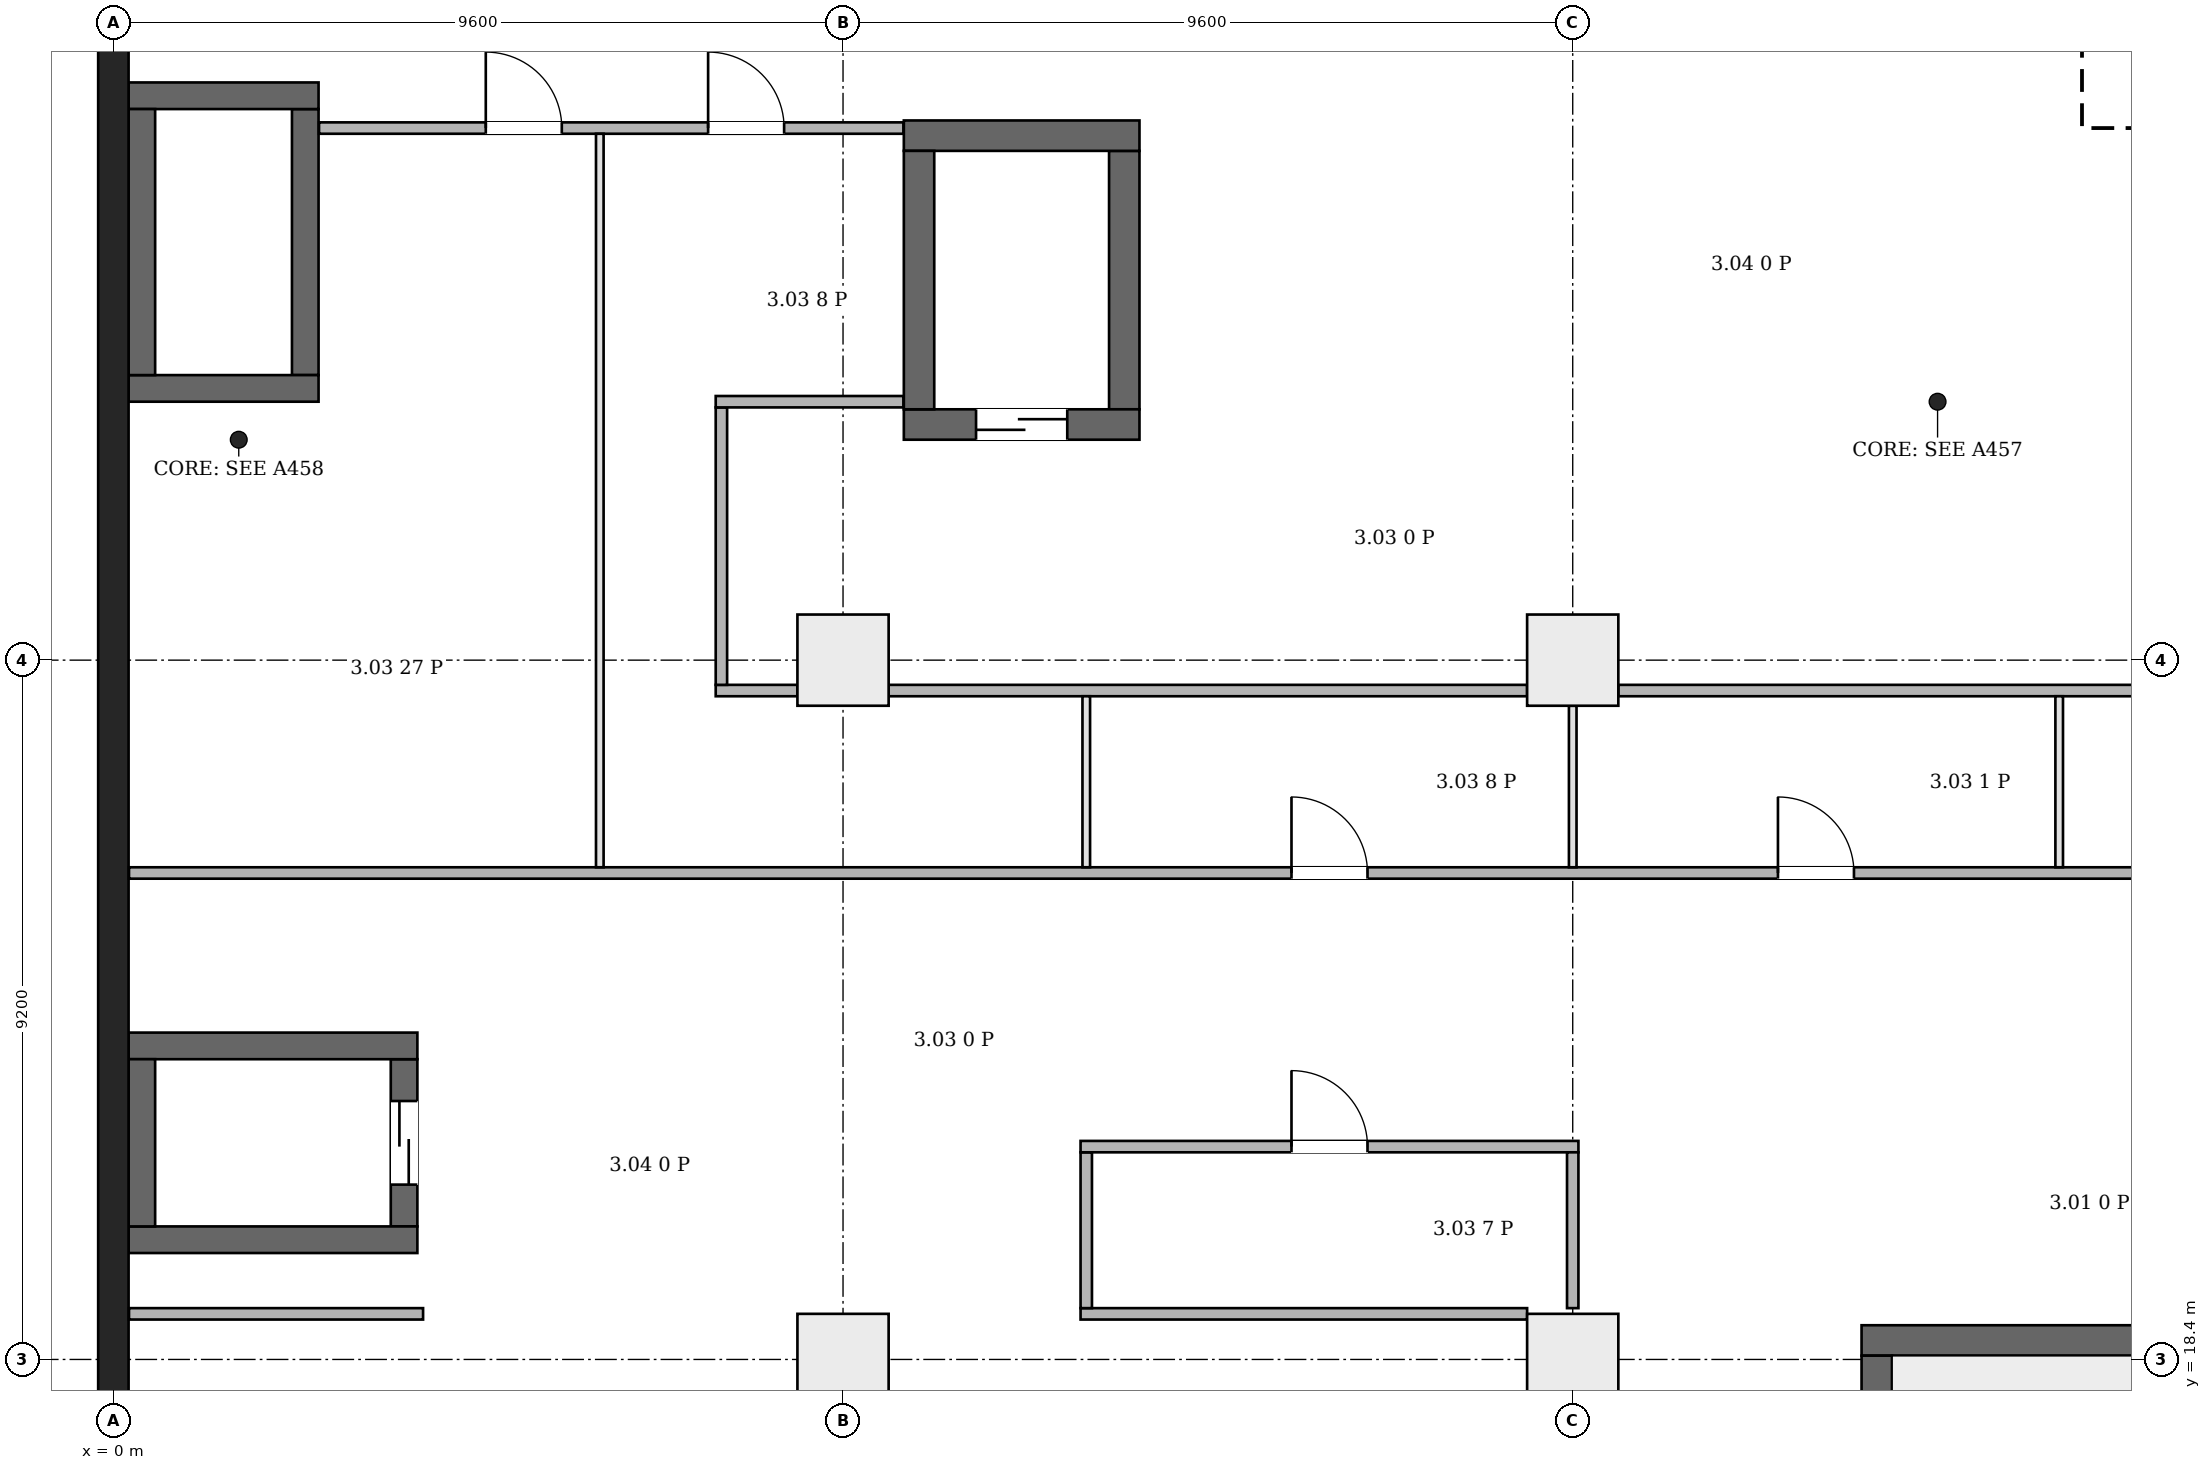
"""IFC4 building model, lengths in metres.
Left out: names, types, materials, properties, quantities, classifications, styles, units other than length and angle.
Written with IfcOpenShell. Run it as: python <this file> out.ifc"""

import sys

from ifc_helpers import new_model, si_unit, direction, frame, frame_2d, origin, origin_2d, place, context, subcontext, project, spatial, rectangle, extrude, element, fill, save


model = new_model("IFC4")
c1 = context("Model", 3, precision=1e-05, world=origin(), true_north=direction((0.0, 1.0)))
c2 = subcontext(c1, "Body", "Model", "MODEL_VIEW")
j1 = project(units=[si_unit("LENGTHUNIT", "METRE"), si_unit("PLANEANGLEUNIT", "RADIAN")], contexts=[c1])
p1 = place(None, origin())
s1 = spatial("IfcSite", under=j1, at=p1, CompositionType="ELEMENT")
p2 = place(p1, origin())
s2 = spatial("IfcBuilding", under=s1, at=p2, CompositionType="ELEMENT")
p3 = place(p2, frame((0.0, 0.0, 21.7)))
s3 = spatial("IfcBuildingStorey", under=s2, at=p3, CompositionType="ELEMENT", Elevation=21.7)
p4 = place(p3, frame((0.0, -0.2, 0.0), z_axis=(0.0, 0.0, 1.0), x_axis=(0.0, 1.0, 0.0)))
e1 = element("IfcWall", 1, at=p4, inside=s3, PredefinedType="SHEAR", context=c2, shape_type="SweptSolid", body=[
    extrude(rectangle(XDim=46.88, YDim=0.4, at=frame_2d((23.44, 0.0))), origin(), (0.0, 0.0, 1.0), 5.0),
])
p5 = place(p3, frame((23.0, 18.65, 0.0), z_axis=(0.0, 0.0, 1.0), x_axis=(1.0, 0.0, 0.0)))
e2 = element("IfcWall", 2, at=p5, inside=s3, PredefinedType="SHEAR", context=c2, shape_type="SweptSolid", body=[
    extrude(rectangle(XDim=4.2, YDim=0.4, at=frame_2d((2.1, 0.0))), origin(), (0.0, 0.0, 1.0), 5.0),
])
p6 = place(p3, frame((23.2, 11.85, 0.0), z_axis=(0.0, 0.0, 1.0), x_axis=(0.0, 1.0, 0.0)))
e3 = element("IfcWall", 3, at=p6, inside=s3, PredefinedType="SHEAR", context=c2, shape_type="SweptSolid", body=[
    extrude(rectangle(XDim=6.6, YDim=0.4, at=frame_2d((3.3, 0.0))), origin(), (0.0, 0.0, 1.0), 5.0),
])
for number, where, z_axis, x_axis in (
    (4, (0.2, 19.975, 0.0), (0.0, 0.0, 1.0), (1.0, 0.0, 0.0)),
    (5, (0.2, 22.525, 0.0), (0.0, 0.0, 1.0), (1.0, 0.0, 0.0)),
):
    element("IfcWall", number, at=place(p3, frame(where, z_axis=z_axis, x_axis=x_axis)), inside=s3, PredefinedType="SHEAR", context=c2, shape_type="SweptSolid", body=[
        extrude(rectangle(XDim=3.8, YDim=0.35, at=frame_2d((1.9, 0.0))), origin(), (0.0, 0.0, 1.0), 5.0),
    ])
p7 = place(p3, frame((0.375, 20.15, 0.0), z_axis=(0.0, 0.0, 1.0), x_axis=(0.0, 1.0, 0.0)))
e6 = element("IfcWall", 6, at=p7, inside=s3, PredefinedType="SHEAR", context=c2, shape_type="SweptSolid", body=[
    extrude(rectangle(XDim=2.2, YDim=0.35, at=frame_2d((1.1, 0.0))), origin(), (0.0, 0.0, 1.0), 5.0),
])
p8 = place(p3, frame((3.825, 20.15, 0.0), z_axis=(0.0, 0.0, 1.0), x_axis=(0.0, 1.0, 0.0)))
e7 = element("IfcWall", 7, at=p8, inside=s3, PredefinedType="SHEAR", context=c2, shape_type="SweptSolid", body=[
    extrude(rectangle(XDim=2.2, YDim=0.35, at=frame_2d((1.1, 0.0))), origin(), (0.0, 0.0, 1.0), 5.0),
])
p9 = place(p8, frame((0.55, 0.0, 0.0)))
e8 = element("IfcOpeningElement", 8, at=p9, cuts=e7, PredefinedType="OPENING", context=c2, shape_type="SweptSolid", body=[
    extrude(rectangle(XDim=1.1, YDim=2.1, at=frame_2d((0.55, 1.05))), frame((0.0, 0.185, 0.0), z_axis=(0.0, -1.0, 0.0), x_axis=(1.0, 0.0, 0.0)), (0.0, 0.0, 1.0), 0.37),
])
for number, where, z_axis, x_axis in (
    (9, (0.2, 31.175, 0.0), (0.0, 0.0, 1.0), (1.0, 0.0, 0.0)),
    (10, (0.2, 35.025, 0.0), (0.0, 0.0, 1.0), (1.0, 0.0, 0.0)),
):
    element("IfcWall", number, at=place(p3, frame(where, z_axis=z_axis, x_axis=x_axis)), inside=s3, PredefinedType="SHEAR", context=c2, shape_type="SweptSolid", body=[
        extrude(rectangle(XDim=2.5, YDim=0.35, at=frame_2d((1.25, 0.0))), origin(), (0.0, 0.0, 1.0), 5.0),
    ])
for number, where, z_axis, x_axis in (
    (11, (0.375, 31.35, 0.0), (0.0, 0.0, 1.0), (0.0, 1.0, 0.0)),
    (12, (2.525, 31.35, 0.0), (0.0, 0.0, 1.0), (0.0, 1.0, 0.0)),
):
    element("IfcWall", number, at=place(p3, frame(where, z_axis=z_axis, x_axis=x_axis)), inside=s3, PredefinedType="SHEAR", context=c2, shape_type="SweptSolid", body=[
        extrude(rectangle(XDim=3.5, YDim=0.35, at=frame_2d((1.75, 0.0))), origin(), (0.0, 0.0, 1.0), 5.0),
    ])
p10 = place(p3, frame((10.4, 30.7, 0.0), z_axis=(0.0, 0.0, 1.0), x_axis=(1.0, 0.0, 0.0)))
e13 = element("IfcWall", 13, at=p10, inside=s3, PredefinedType="SHEAR", context=c2, shape_type="SweptSolid", body=[
    extrude(rectangle(XDim=3.1, YDim=0.4, at=frame_2d((1.55, 0.0))), origin(), (0.0, 0.0, 1.0), 5.0),
])
p11 = place(p10, frame((0.95, 0.0, 0.0)))
e14 = element("IfcOpeningElement", 14, at=p11, cuts=e13, PredefinedType="OPENING", context=c2, shape_type="SweptSolid", body=[
    extrude(rectangle(XDim=1.2, YDim=2.1, at=frame_2d((0.6, 1.05))), frame((0.0, 0.21, 0.0), z_axis=(0.0, -1.0, 0.0), x_axis=(1.0, 0.0, 0.0)), (0.0, 0.0, 1.0), 0.42),
])
p12 = place(p3, frame((10.4, 34.5, 0.0), z_axis=(0.0, 0.0, 1.0), x_axis=(1.0, 0.0, 0.0)))
e15 = element("IfcWall", 15, at=p12, inside=s3, PredefinedType="SHEAR", context=c2, shape_type="SweptSolid", body=[
    extrude(rectangle(XDim=3.1, YDim=0.4, at=frame_2d((1.55, 0.0))), origin(), (0.0, 0.0, 1.0), 5.0),
])
for number, where, z_axis, x_axis in (
    (16, (10.6, 30.9, 0.0), (0.0, 0.0, 1.0), (0.0, 1.0, 0.0)),
    (17, (13.3, 30.9, 0.0), (0.0, 0.0, 1.0), (0.0, 1.0, 0.0)),
):
    element("IfcWall", number, at=place(p3, frame(where, z_axis=z_axis, x_axis=x_axis)), inside=s3, PredefinedType="SHEAR", context=c2, shape_type="SweptSolid", body=[
        extrude(rectangle(XDim=3.4, YDim=0.4, at=frame_2d((1.7, 0.0))), origin(), (0.0, 0.0, 1.0), 5.0),
    ])
for number, where, z_axis, x_axis in (
    (18, (9.6, 18.4, 0.0), (0.0, 0.0, 1.0), (1.0, 0.0, 0.0)),
    (19, (19.2, 18.4, 0.0), (0.0, 0.0, 1.0), (1.0, 0.0, 0.0)),
    (20, (9.6, 27.6, 0.0), (0.0, 0.0, 1.0), (1.0, 0.0, 0.0)),
    (21, (19.2, 27.6, 0.0), (0.0, 0.0, 1.0), (1.0, 0.0, 0.0)),
):
    element("IfcColumn", number, at=place(p3, frame(where, z_axis=z_axis, x_axis=x_axis)), inside=s3, PredefinedType="COLUMN", context=c2, shape_type="SweptSolid", body=[
        extrude(rectangle(XDim=1.2, YDim=1.2, at=origin_2d()), origin(), (0.0, 0.0, 1.0), 5.0),
    ])
p13 = place(p3, frame((0.206, 19.0, 0.0), z_axis=(0.0, 0.0, 1.0), x_axis=(1.0, 0.0, 0.0)))
e22 = element("IfcWall", 22, at=p13, inside=s3, PredefinedType="PARTITIONING", context=c2, shape_type="SweptSolid", body=[
    extrude(rectangle(XDim=3.869, YDim=0.15, at=frame_2d((1.935, 0.0))), origin(), (0.0, 0.0, 1.0), 4.65),
])
p14 = place(p3, frame((0.206, 24.8, 0.0), z_axis=(0.0, 0.0, 1.0), x_axis=(1.0, 0.0, 0.0)))
e23 = element("IfcWall", 23, at=p14, inside=s3, PredefinedType="PARTITIONING", context=c2, shape_type="SweptSolid", body=[
    extrude(rectangle(XDim=39.119, YDim=0.15, at=frame_2d((19.56, 0.0))), origin(), (0.0, 0.0, 1.0), 4.65),
])
p15 = place(p14, frame((15.294, 0.0, 0.0)))
e24 = element("IfcOpeningElement", 24, at=p15, cuts=e23, PredefinedType="OPENING", context=c2, shape_type="SweptSolid", body=[
    extrude(rectangle(XDim=1.0, YDim=2.1, at=frame_2d((0.5, 1.05))), frame((0.0, 0.085, 0.0), z_axis=(0.0, -1.0, 0.0), x_axis=(1.0, 0.0, 0.0)), (0.0, 0.0, 1.0), 0.17),
])
p16 = place(p14, frame((21.694, 0.0, 0.0)))
e25 = element("IfcOpeningElement", 25, at=p16, cuts=e23, PredefinedType="OPENING", context=c2, shape_type="SweptSolid", body=[
    extrude(rectangle(XDim=1.0, YDim=2.1, at=frame_2d((0.5, 1.05))), frame((0.0, 0.085, 0.0), z_axis=(0.0, -1.0, 0.0), x_axis=(1.0, 0.0, 0.0)), (0.0, 0.0, 1.0), 0.17),
])
p17 = place(p14, frame((28.094, 0.0, 0.0)))
e26 = element("IfcOpeningElement", 26, at=p17, cuts=e23, PredefinedType="OPENING", context=c2, shape_type="SweptSolid", body=[
    extrude(rectangle(XDim=1.0, YDim=2.1, at=frame_2d((0.5, 1.05))), frame((0.0, 0.085, 0.0), z_axis=(0.0, -1.0, 0.0), x_axis=(1.0, 0.0, 0.0)), (0.0, 0.0, 1.0), 0.17),
])
p18 = place(p3, frame((2.706, 34.6, 0.0), z_axis=(0.0, 0.0, 1.0), x_axis=(1.0, 0.0, 0.0)))
e27 = element("IfcWall", 27, at=p18, inside=s3, PredefinedType="PARTITIONING", context=c2, shape_type="SweptSolid", body=[
    extrude(rectangle(XDim=7.688, YDim=0.15, at=frame_2d((3.844, 0.0))), origin(), (0.0, 0.0, 1.0), 4.65),
])
p19 = place(p18, frame((2.194, 0.0, 0.0)))
e28 = element("IfcOpeningElement", 28, at=p19, cuts=e27, PredefinedType="OPENING", context=c2, shape_type="SweptSolid", body=[
    extrude(rectangle(XDim=1.0, YDim=2.1, at=frame_2d((0.5, 1.05))), frame((0.0, 0.085, 0.0), z_axis=(0.0, -1.0, 0.0), x_axis=(1.0, 0.0, 0.0)), (0.0, 0.0, 1.0), 0.17),
])
p20 = place(p18, frame((5.119, 0.0, 0.0)))
e29 = element("IfcOpeningElement", 29, at=p20, cuts=e27, PredefinedType="OPENING", context=c2, shape_type="SweptSolid", body=[
    extrude(rectangle(XDim=1.0, YDim=2.1, at=frame_2d((0.5, 1.05))), frame((0.0, 0.085, 0.0), z_axis=(0.0, -1.0, 0.0), x_axis=(1.0, 0.0, 0.0)), (0.0, 0.0, 1.0), 0.17),
])
p21 = place(p3, frame((6.4, 24.875, 0.0), z_axis=(0.0, 0.0, 1.0), x_axis=(0.0, 1.0, 0.0)))
e30 = element("IfcWall", 30, at=p21, inside=s3, PredefinedType="PARTITIONING", context=c2, shape_type="SweptSolid", body=[
    extrude(rectangle(XDim=9.65, YDim=0.1, at=frame_2d((4.825, 0.0))), origin(), (0.0, 0.0, 1.0), 4.65),
])
p22 = place(p3, frame((7.925, 27.2, 0.0), z_axis=(0.0, 0.0, 1.0), x_axis=(1.0, 0.0, 0.0)))
e31 = element("IfcWall", 31, at=p22, inside=s3, PredefinedType="PARTITIONING", context=c2, shape_type="SweptSolid", body=[
    extrude(rectangle(XDim=1.075, YDim=0.15, at=frame_2d((0.538, 0.0))), origin(), (0.0, 0.0, 1.0), 4.65),
])
p23 = place(p3, frame((8.0, 27.275, 0.0), z_axis=(0.0, 0.0, 1.0), x_axis=(0.0, 1.0, 0.0)))
e32 = element("IfcWall", 32, at=p23, inside=s3, PredefinedType="PARTITIONING", context=c2, shape_type="SweptSolid", body=[
    extrude(rectangle(XDim=3.65, YDim=0.15, at=frame_2d((1.825, 0.0))), origin(), (0.0, 0.0, 1.0), 4.65),
])
p24 = place(p3, frame((7.925, 31.0, 0.0), z_axis=(0.0, 0.0, 1.0), x_axis=(1.0, 0.0, 0.0)))
e33 = element("IfcWall", 33, at=p24, inside=s3, PredefinedType="PARTITIONING", context=c2, shape_type="SweptSolid", body=[
    extrude(rectangle(XDim=2.469, YDim=0.15, at=frame_2d((1.234, 0.0))), origin(), (0.0, 0.0, 1.0), 4.65),
])
p25 = place(p3, frame((10.2, 27.2, 0.0), z_axis=(0.0, 0.0, 1.0), x_axis=(1.0, 0.0, 0.0)))
e34 = element("IfcWall", 34, at=p25, inside=s3, PredefinedType="PARTITIONING", context=c2, shape_type="SweptSolid", body=[
    extrude(rectangle(XDim=8.4, YDim=0.15, at=frame_2d((4.2, 0.0))), origin(), (0.0, 0.0, 1.0), 4.65),
])
p26 = place(p3, frame((12.725, 19.0, 0.0), z_axis=(0.0, 0.0, 1.0), x_axis=(1.0, 0.0, 0.0)))
e35 = element("IfcWall", 35, at=p26, inside=s3, PredefinedType="PARTITIONING", context=c2, shape_type="SweptSolid", body=[
    extrude(rectangle(XDim=5.875, YDim=0.15, at=frame_2d((2.938, 0.0))), origin(), (0.0, 0.0, 1.0), 4.65),
])
p27 = place(p3, frame((12.8, 19.075, 0.0), z_axis=(0.0, 0.0, 1.0), x_axis=(0.0, 1.0, 0.0)))
e36 = element("IfcWall", 36, at=p27, inside=s3, PredefinedType="PARTITIONING", context=c2, shape_type="SweptSolid", body=[
    extrude(rectangle(XDim=2.05, YDim=0.15, at=frame_2d((1.025, 0.0))), origin(), (0.0, 0.0, 1.0), 4.65),
])
p28 = place(p3, frame((12.725, 21.2, 0.0), z_axis=(0.0, 0.0, 1.0), x_axis=(1.0, 0.0, 0.0)))
e37 = element("IfcWall", 37, at=p28, inside=s3, PredefinedType="PARTITIONING", context=c2, shape_type="SweptSolid", body=[
    extrude(rectangle(XDim=6.55, YDim=0.15, at=frame_2d((3.275, 0.0))), origin(), (0.0, 0.0, 1.0), 4.65),
])
p29 = place(p28, frame((2.775, 0.0, 0.0)))
e38 = element("IfcOpeningElement", 38, at=p29, cuts=e37, PredefinedType="OPENING", context=c2, shape_type="SweptSolid", body=[
    extrude(rectangle(XDim=1.0, YDim=2.1, at=frame_2d((0.5, 1.05))), frame((0.0, 0.085, 0.0), z_axis=(0.0, -1.0, 0.0), x_axis=(1.0, 0.0, 0.0)), (0.0, 0.0, 1.0), 0.17),
])
p30 = place(p3, frame((12.8, 24.875, 0.0), z_axis=(0.0, 0.0, 1.0), x_axis=(0.0, 1.0, 0.0)))
e39 = element("IfcWall", 39, at=p30, inside=s3, PredefinedType="PARTITIONING", context=c2, shape_type="SweptSolid", body=[
    extrude(rectangle(XDim=2.25, YDim=0.1, at=frame_2d((1.125, 0.0))), origin(), (0.0, 0.0, 1.0), 4.65),
])
p31 = place(p3, frame((19.2, 19.075, 0.0), z_axis=(0.0, 0.0, 1.0), x_axis=(0.0, 1.0, 0.0)))
e40 = element("IfcWall", 40, at=p31, inside=s3, PredefinedType="PARTITIONING", context=c2, shape_type="SweptSolid", body=[
    extrude(rectangle(XDim=2.05, YDim=0.15, at=frame_2d((1.025, 0.0))), origin(), (0.0, 0.0, 1.0), 4.25),
])
p32 = place(p3, frame((19.2, 24.875, 0.0), z_axis=(0.0, 0.0, 1.0), x_axis=(0.0, 1.0, 0.0)))
e41 = element("IfcWall", 41, at=p32, inside=s3, PredefinedType="PARTITIONING", context=c2, shape_type="SweptSolid", body=[
    extrude(rectangle(XDim=2.125, YDim=0.1, at=frame_2d((1.062, 0.0))), origin(), (0.0, 0.0, 1.0), 4.25),
])
p33 = place(p3, frame((19.8, 27.2, 0.0), z_axis=(0.0, 0.0, 1.0), x_axis=(1.0, 0.0, 0.0)))
e42 = element("IfcWall", 42, at=p33, inside=s3, PredefinedType="PARTITIONING", context=c2, shape_type="SweptSolid", body=[
    extrude(rectangle(XDim=8.4, YDim=0.15, at=frame_2d((4.2, 0.0))), origin(), (0.0, 0.0, 1.0), 4.65),
])
p34 = place(p3, frame((25.6, 24.875, 0.0), z_axis=(0.0, 0.0, 1.0), x_axis=(0.0, 1.0, 0.0)))
e43 = element("IfcWall", 43, at=p34, inside=s3, PredefinedType="PARTITIONING", context=c2, shape_type="SweptSolid", body=[
    extrude(rectangle(XDim=2.25, YDim=0.1, at=frame_2d((1.125, 0.0))), origin(), (0.0, 0.0, 1.0), 4.65),
])
p35 = place(p9, origin())
e44 = element("IfcDoor", 44, at=p35, inside=s3, OperationType="DOUBLE_DOOR_SLIDING", PredefinedType="DOOR", context=c2, shape_type="SweptSolid", body=[
    extrude(rectangle(XDim=1.1, YDim=2.1, at=frame_2d((0.55, 1.05))), frame((0.0, 0.025, 0.0), z_axis=(0.0, -1.0, 0.0), x_axis=(1.0, 0.0, 0.0)), (0.0, 0.0, 1.0), 0.05),
])
fill(e8, e44)
p36 = place(p11, origin())
e45 = element("IfcDoor", 45, at=p36, inside=s3, OperationType="DOUBLE_DOOR_SLIDING", PredefinedType="DOOR", context=c2, shape_type="SweptSolid", body=[
    extrude(rectangle(XDim=1.2, YDim=2.1, at=frame_2d((0.6, 1.05))), frame((0.0, 0.025, 0.0), z_axis=(0.0, -1.0, 0.0), x_axis=(1.0, 0.0, 0.0)), (0.0, 0.0, 1.0), 0.05),
])
fill(e14, e45)
p37 = place(p29, origin())
e46 = element("IfcDoor", 46, at=p37, inside=s3, OperationType="SINGLE_SWING_RIGHT", PredefinedType="DOOR", context=c2, shape_type="SweptSolid", body=[
    extrude(rectangle(XDim=1.0, YDim=2.1, at=frame_2d((0.5, 1.05))), frame((0.0, 0.025, 0.0), z_axis=(0.0, -1.0, 0.0), x_axis=(1.0, 0.0, 0.0)), (0.0, 0.0, 1.0), 0.05),
])
fill(e38, e46)
p38 = place(p19, origin())
e47 = element("IfcDoor", 47, at=p38, inside=s3, OperationType="SINGLE_SWING_RIGHT", PredefinedType="DOOR", context=c2, shape_type="SweptSolid", body=[
    extrude(rectangle(XDim=1.0, YDim=2.1, at=frame_2d((0.5, 1.05))), frame((0.0, 0.025, 0.0), z_axis=(0.0, -1.0, 0.0), x_axis=(1.0, 0.0, 0.0)), (0.0, 0.0, 1.0), 0.05),
])
fill(e28, e47)
p39 = place(p20, origin())
e48 = element("IfcDoor", 48, at=p39, inside=s3, OperationType="SINGLE_SWING_LEFT", PredefinedType="DOOR", context=c2, shape_type="SweptSolid", body=[
    extrude(rectangle(XDim=1.0, YDim=2.1, at=frame_2d((0.5, 1.05))), frame((0.0, 0.025, 0.0), z_axis=(0.0, -1.0, 0.0), x_axis=(1.0, 0.0, 0.0)), (0.0, 0.0, 1.0), 0.05),
])
fill(e29, e48)
p40 = place(p15, origin())
e49 = element("IfcDoor", 49, at=p40, inside=s3, OperationType="SINGLE_SWING_LEFT", PredefinedType="DOOR", context=c2, shape_type="SweptSolid", body=[
    extrude(rectangle(XDim=1.0, YDim=2.1, at=frame_2d((0.5, 1.05))), frame((0.0, 0.025, 0.0), z_axis=(0.0, -1.0, 0.0), x_axis=(1.0, 0.0, 0.0)), (0.0, 0.0, 1.0), 0.05),
])
fill(e24, e49)
p41 = place(p16, origin())
e50 = element("IfcDoor", 50, at=p41, inside=s3, OperationType="SINGLE_SWING_RIGHT", PredefinedType="DOOR", context=c2, shape_type="SweptSolid", body=[
    extrude(rectangle(XDim=1.0, YDim=2.1, at=frame_2d((0.5, 1.05))), frame((0.0, 0.025, 0.0), z_axis=(0.0, -1.0, 0.0), x_axis=(1.0, 0.0, 0.0)), (0.0, 0.0, 1.0), 0.05),
])
fill(e25, e50)
save(model, sys.argv[1])
